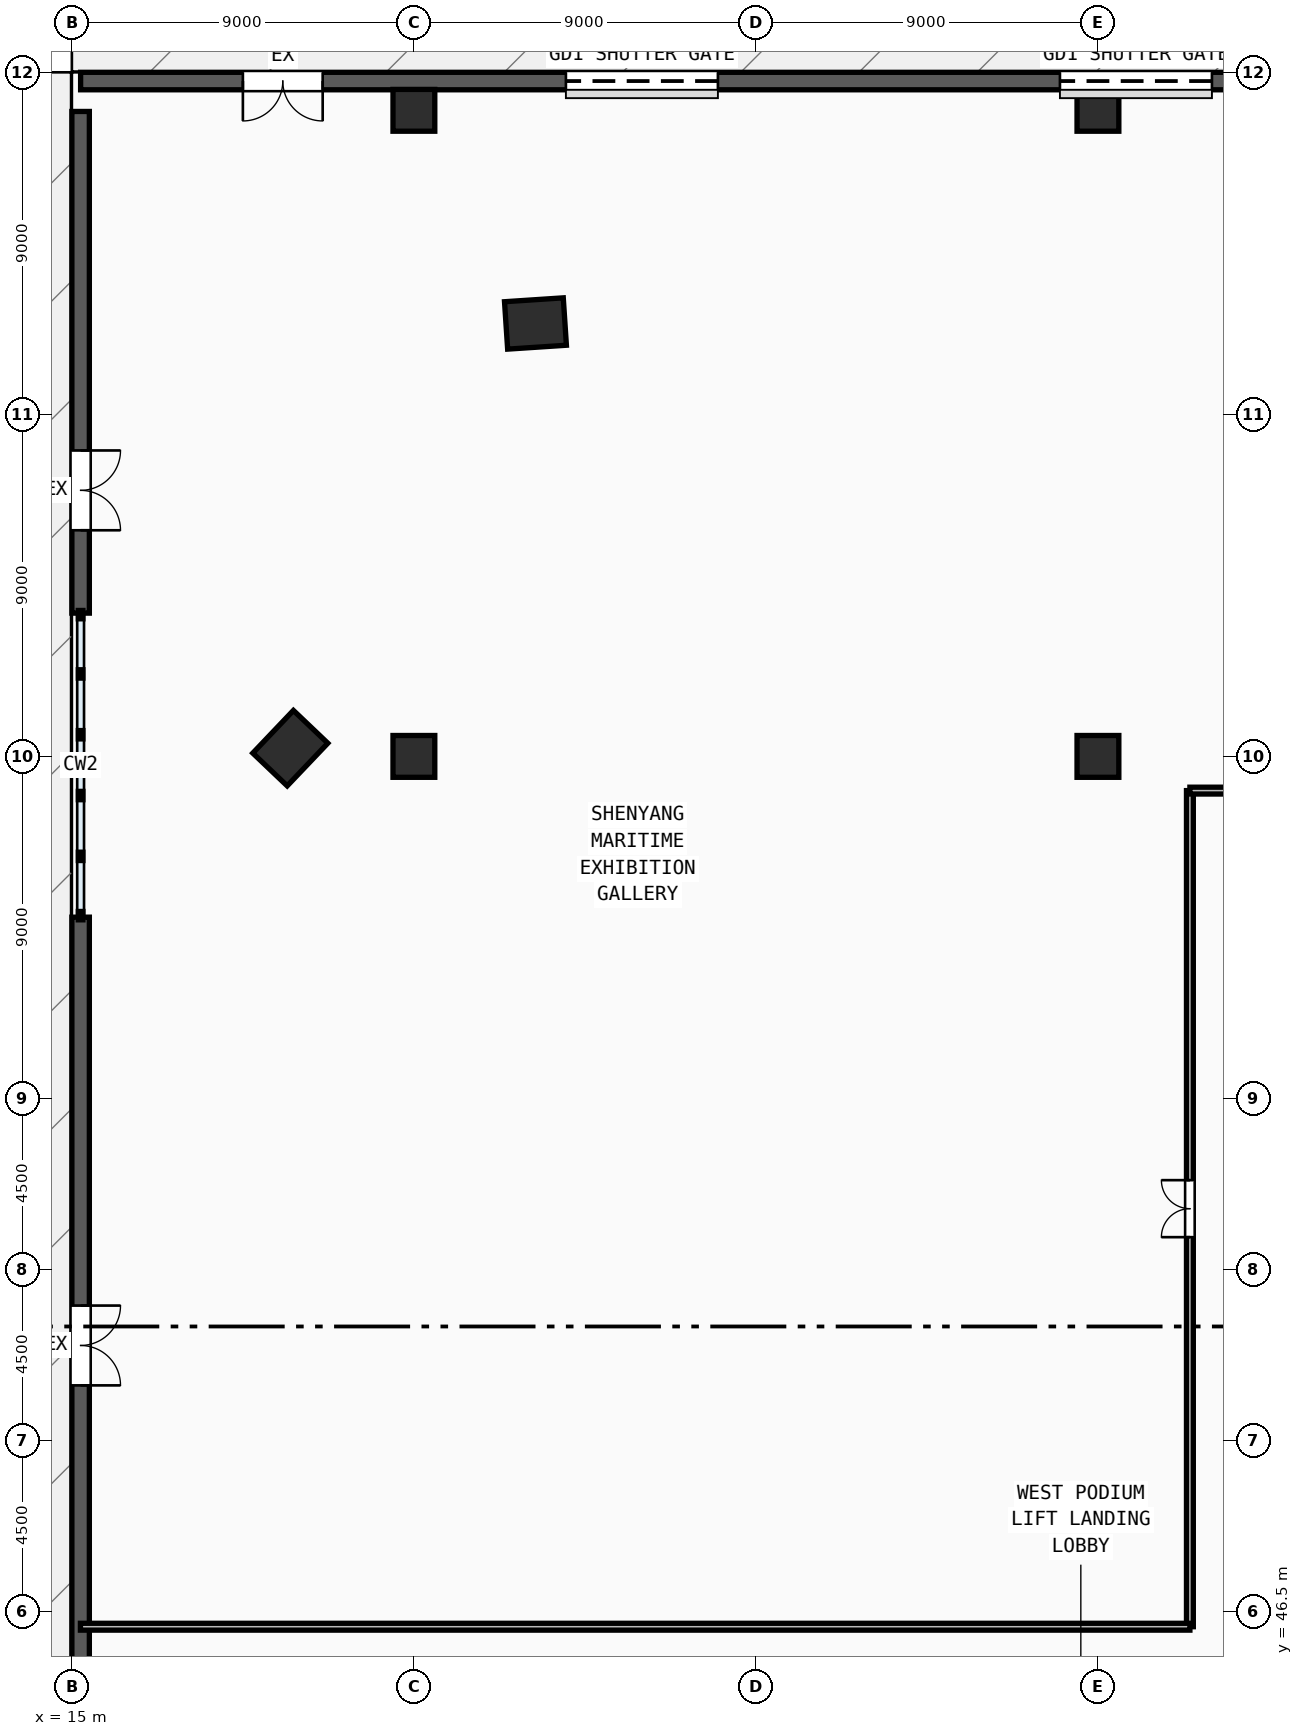
"""IFC4 building model, lengths in metres.
Left out: names, types, materials, properties, quantities, classifications, styles, units other than length and angle.
Written with IfcOpenShell. Run it as: python <this file> out.ifc"""

import sys

from ifc_helpers import new_model, si_unit, direction, frame, frame_2d, origin, origin_2d, place, context, subcontext, project, spatial, rectangle, extrude, source, transform, mapped, element, fill, save


model = new_model("IFC4")
c1 = context("Model", 3, precision=1e-05, world=origin(), true_north=direction((0.0, 1.0)))
c2 = subcontext(c1, "Body", "Model", "MODEL_VIEW")
j1 = project(units=[si_unit("LENGTHUNIT", "METRE"), si_unit("PLANEANGLEUNIT", "RADIAN")], contexts=[c1])
p1 = place(None, origin())
s1 = spatial("IfcSite", under=j1, at=p1, CompositionType="ELEMENT")
p2 = place(p1, origin())
s2 = spatial("IfcBuilding", under=s1, at=p2, CompositionType="ELEMENT")
p3 = place(p2, origin())
s3 = spatial("IfcBuildingStorey", under=s2, at=p3, CompositionType="ELEMENT", Elevation=0.0)
m1 = source(origin(), c2, "Body", "SweptSolid", [
    extrude(rectangle(XDim=1.55, YDim=1.25, at=origin_2d()), origin(), (0.0, 0.0, 1.0), 5.4),
])
for number, where, z_axis, x_axis in (
    (1, (20.748, 69.217, 0.0), (0.0, 0.0, 1.0), (0.689, 0.724, 0.0)),
    (2, (27.199, 80.391, 0.0), (0.0, 0.0, 1.0), (0.998, 0.066, 0.0)),
):
    element("IfcColumn", number, at=place(p3, frame(where, z_axis=z_axis, x_axis=x_axis)), inside=s3, PredefinedType="COLUMN", context=c2, shape_type="MappedRepresentation", body=[
        mapped(m1, transform((0.0, 0.0, 0.0), x_axis=(1.0, 0.0, 0.0), y_axis=(0.0, 1.0, 0.0), z_axis=(0.0, 0.0, 1.0), scale=1.0)),
    ])
m2 = source(origin(), c2, "Body", "SweptSolid", [
    extrude(rectangle(XDim=1.1, YDim=1.1, at=origin_2d()), origin(), (0.0, 0.0, 1.0), 5.4),
])
for number, where, z_axis, x_axis in (
    (3, (24.0, 69.0, 0.0), (0.0, 0.0, 1.0), (1.0, 0.0, 0.0)),
    (4, (42.0, 69.0, 0.0), (0.0, 0.0, 1.0), (1.0, 0.0, 0.0)),
    (5, (24.0, 86.0, 0.0), (0.0, 0.0, 1.0), (1.0, 0.0, 0.0)),
    (6, (42.0, 86.0, 0.0), (0.0, 0.0, 1.0), (1.0, 0.0, 0.0)),
):
    element("IfcColumn", number, at=place(p3, frame(where, z_axis=z_axis, x_axis=x_axis)), inside=s3, PredefinedType="COLUMN", context=c2, shape_type="MappedRepresentation", body=[
        mapped(m2, transform((0.0, 0.0, 0.0), x_axis=(1.0, 0.0, 0.0), y_axis=(0.0, 1.0, 0.0), z_axis=(0.0, 0.0, 1.0), scale=1.0)),
    ])
p4 = place(p3, frame((104.77, 86.77, 0.0), z_axis=(0.0, 0.0, 1.0), x_axis=(-1.0, 0.0, 0.0)))
e7 = element("IfcWall", 7, at=p4, inside=s3, PredefinedType="SOLIDWALL", context=c2, shape_type="SweptSolid", body=[
    extrude(rectangle(XDim=89.54, YDim=0.46, at=frame_2d((44.77, 0.0))), origin(), (0.0, 0.0, 1.0), 5.15),
])
m3 = source(origin(), c2, "Body", "SweptSolid", [
    extrude(rectangle(XDim=2.1, YDim=2.4, at=frame_2d((1.05, 1.2))), frame((0.0, 0.24, 0.0), z_axis=(0.0, -1.0, 0.0), x_axis=(1.0, 0.0, 0.0)), (0.0, 0.0, 1.0), 0.48),
])
p5 = place(p4, frame((49.42, 0.0, 0.0)))
e8 = element("IfcOpeningElement", 8, at=p5, cuts=e7, PredefinedType="OPENING", context=c2, shape_type="MappedRepresentation", body=[
    mapped(m3, transform((0.0, 0.0, 0.0), x_axis=(1.0, 0.0, 0.0), y_axis=(0.0, 1.0, 0.0), z_axis=(0.0, 0.0, 1.0), scale=1.0)),
])
p6 = place(p4, frame((83.17, 0.0, 0.0)))
e9 = element("IfcOpeningElement", 9, at=p6, cuts=e7, PredefinedType="OPENING", context=c2, shape_type="MappedRepresentation", body=[
    mapped(m3, transform((0.0, 0.0, 0.0), x_axis=(1.0, 0.0, 0.0), y_axis=(0.0, 1.0, 0.0), z_axis=(0.0, 0.0, 1.0), scale=1.0)),
])
p7 = place(p4, frame((44.17, 0.0, 0.0)))
e10 = element("IfcOpeningElement", 10, at=p7, cuts=e7, PredefinedType="OPENING", context=c2, shape_type="MappedRepresentation", body=[
    mapped(m3, transform((0.0, 0.0, 0.0), x_axis=(1.0, 0.0, 0.0), y_axis=(0.0, 1.0, 0.0), z_axis=(0.0, 0.0, 1.0), scale=1.0)),
])
m4 = source(origin(), c2, "Body", "SweptSolid", [
    extrude(rectangle(XDim=4.0, YDim=3.8, at=frame_2d((2.0, 1.9))), frame((0.0, 0.24, 0.0), z_axis=(0.0, -1.0, 0.0), x_axis=(1.0, 0.0, 0.0)), (0.0, 0.0, 1.0), 0.48),
])
p8 = place(p4, frame((72.77, 0.0, 0.0)))
e11 = element("IfcOpeningElement", 11, at=p8, cuts=e7, PredefinedType="OPENING", context=c2, shape_type="MappedRepresentation", body=[
    mapped(m4, transform((0.0, 0.0, 0.0), x_axis=(1.0, 0.0, 0.0), y_axis=(0.0, 1.0, 0.0), z_axis=(0.0, 0.0, 1.0), scale=1.0)),
])
p9 = place(p4, frame((59.77, 0.0, 0.0)))
e12 = element("IfcOpeningElement", 12, at=p9, cuts=e7, PredefinedType="OPENING", context=c2, shape_type="MappedRepresentation", body=[
    mapped(m4, transform((0.0, 0.0, 0.0), x_axis=(1.0, 0.0, 0.0), y_axis=(0.0, 1.0, 0.0), z_axis=(0.0, 0.0, 1.0), scale=1.0)),
])
p10 = place(p4, frame((35.77, 0.0, 0.0)))
e13 = element("IfcOpeningElement", 13, at=p10, cuts=e7, PredefinedType="OPENING", context=c2, shape_type="MappedRepresentation", body=[
    mapped(m4, transform((0.0, 0.0, 0.0), x_axis=(1.0, 0.0, 0.0), y_axis=(0.0, 1.0, 0.0), z_axis=(0.0, 0.0, 1.0), scale=1.0)),
])
p11 = place(p4, frame((16.77, 0.0, 0.0)))
e14 = element("IfcOpeningElement", 14, at=p11, cuts=e7, PredefinedType="OPENING", context=c2, shape_type="MappedRepresentation", body=[
    mapped(m4, transform((0.0, 0.0, 0.0), x_axis=(1.0, 0.0, 0.0), y_axis=(0.0, 1.0, 0.0), z_axis=(0.0, 0.0, 1.0), scale=1.0)),
])
p12 = place(p4, frame((2.27, 0.0, 0.0)))
e15 = element("IfcOpeningElement", 15, at=p12, cuts=e7, PredefinedType="OPENING", context=c2, shape_type="MappedRepresentation", body=[
    mapped(m4, transform((0.0, 0.0, 0.0), x_axis=(1.0, 0.0, 0.0), y_axis=(0.0, 1.0, 0.0), z_axis=(0.0, 0.0, 1.0), scale=1.0)),
])
p13 = place(p3, frame((15.23, 85.97, 0.0), z_axis=(0.0, 0.0, 1.0), x_axis=(0.0, -1.0, 0.0)))
e16 = element("IfcWall", 16, at=p13, inside=s3, PredefinedType="SOLIDWALL", context=c2, shape_type="SweptSolid", body=[
    extrude(rectangle(XDim=13.2, YDim=0.46, at=frame_2d((6.6, 0.0))), origin(), (0.0, 0.0, 1.0), 5.15),
])
p14 = place(p13, frame((8.92, 0.0, 0.0)))
e17 = element("IfcOpeningElement", 17, at=p14, cuts=e16, PredefinedType="OPENING", context=c2, shape_type="MappedRepresentation", body=[
    mapped(m3, transform((0.0, 0.0, 0.0), x_axis=(1.0, 0.0, 0.0), y_axis=(0.0, 1.0, 0.0), z_axis=(0.0, 0.0, 1.0), scale=1.0)),
])
p15 = place(p3, frame((15.23, 64.77, 0.0), z_axis=(0.0, 0.0, 1.0), x_axis=(0.0, -1.0, 0.0)))
e18 = element("IfcWall", 18, at=p15, inside=s3, PredefinedType="SOLIDWALL", context=c2, shape_type="SweptSolid", body=[
    extrude(rectangle(XDim=20.0, YDim=0.46, at=frame_2d((10.0, 0.0))), origin(), (0.0, 0.0, 1.0), 5.15),
])
p16 = place(p15, frame((10.22, 0.0, 0.0)))
e19 = element("IfcOpeningElement", 19, at=p16, cuts=e18, PredefinedType="OPENING", context=c2, shape_type="MappedRepresentation", body=[
    mapped(m3, transform((0.0, 0.0, 0.0), x_axis=(1.0, 0.0, 0.0), y_axis=(0.0, 1.0, 0.0), z_axis=(0.0, 0.0, 1.0), scale=1.0)),
])
p17 = place(p3, frame((44.42, 46.1, 0.0), z_axis=(0.0, 0.0, 1.0), x_axis=(0.0, 1.0, 0.0)))
e20 = element("IfcWall", 20, at=p17, inside=s3, PredefinedType="PARTITIONING", context=c2, shape_type="SweptSolid", body=[
    extrude(rectangle(XDim=22.0, YDim=0.18, at=frame_2d((11.0, 0.0))), origin(), (0.0, 0.0, 1.0), 5.15),
])
m5 = source(origin(), c2, "Body", "SweptSolid", [
    extrude(rectangle(XDim=1.5, YDim=2.2, at=frame_2d((0.75, 1.1))), frame((0.0, 0.1, 0.0), z_axis=(0.0, -1.0, 0.0), x_axis=(1.0, 0.0, 0.0)), (0.0, 0.0, 1.0), 0.2),
])
p18 = place(p17, frame((10.25, 0.0, 0.0)))
e21 = element("IfcOpeningElement", 21, at=p18, cuts=e20, PredefinedType="OPENING", context=c2, shape_type="MappedRepresentation", body=[
    mapped(m5, transform((0.0, 0.0, 0.0), x_axis=(1.0, 0.0, 0.0), y_axis=(0.0, 1.0, 0.0), z_axis=(0.0, 0.0, 1.0), scale=1.0)),
])
p19 = place(p3, frame((15.225, 46.1, 0.0), z_axis=(0.0, 0.0, 1.0), x_axis=(1.0, 0.0, 0.0)))
e22 = element("IfcWall", 22, at=p19, inside=s3, PredefinedType="PARTITIONING", context=c2, shape_type="SweptSolid", body=[
    extrude(rectangle(XDim=29.195, YDim=0.18, at=frame_2d((14.597, 0.0))), origin(), (0.0, 0.0, 1.0), 5.15),
])
p20 = place(p3, frame((44.42, 68.1, 0.0), z_axis=(0.0, 0.0, 1.0), x_axis=(1.0, 0.0, 0.0)))
e23 = element("IfcWall", 23, at=p20, inside=s3, PredefinedType="PARTITIONING", context=c2, shape_type="SweptSolid", body=[
    extrude(rectangle(XDim=3.88, YDim=0.18, at=frame_2d((1.94, 0.0))), origin(), (0.0, 0.0, 1.0), 5.15),
])
m6 = source(origin(), c2, "Body", "SweptSolid", [
    extrude(rectangle(XDim=2.1, YDim=2.4, at=frame_2d((1.05, 1.2))), frame((0.0, 0.025, 0.0), z_axis=(0.0, -1.0, 0.0), x_axis=(1.0, 0.0, 0.0)), (0.0, 0.0, 1.0), 0.05),
])
p21 = place(p6, frame((2.1, 0.0, 0.0), z_axis=(0.0, 0.0, 1.0), x_axis=(-1.0, 0.0, 0.0)))
e24 = element("IfcDoor", 24, at=p21, inside=s3, OperationType="DOUBLE_DOOR_SINGLE_SWING", PredefinedType="DOOR", context=c2, shape_type="MappedRepresentation", body=[
    mapped(m6, transform((0.0, 0.0, 0.0), x_axis=(1.0, 0.0, 0.0), y_axis=(0.0, 1.0, 0.0), z_axis=(0.0, 0.0, 1.0), scale=1.0)),
])
fill(e9, e24)
m7 = source(origin(), c2, "Body", "SweptSolid", [
    extrude(rectangle(XDim=4.0, YDim=3.8, at=frame_2d((2.0, 1.9))), frame((0.0, 0.025, 0.0), z_axis=(0.0, -1.0, 0.0), x_axis=(1.0, 0.0, 0.0)), (0.0, 0.0, 1.0), 0.05),
])
p22 = place(p8, origin())
e25 = element("IfcDoor", 25, at=p22, inside=s3, OperationType="ROLLINGUP", PredefinedType="GATE", context=c2, shape_type="MappedRepresentation", body=[
    mapped(m7, transform((0.0, 0.0, 0.0), x_axis=(1.0, 0.0, 0.0), y_axis=(0.0, 1.0, 0.0), z_axis=(0.0, 0.0, 1.0), scale=1.0)),
])
fill(e11, e25)
p23 = place(p9, origin())
e26 = element("IfcDoor", 26, at=p23, inside=s3, OperationType="ROLLINGUP", PredefinedType="GATE", context=c2, shape_type="MappedRepresentation", body=[
    mapped(m7, transform((0.0, 0.0, 0.0), x_axis=(1.0, 0.0, 0.0), y_axis=(0.0, 1.0, 0.0), z_axis=(0.0, 0.0, 1.0), scale=1.0)),
])
fill(e12, e26)
p24 = place(p16, frame((2.1, 0.0, 0.0), z_axis=(0.0, 0.0, 1.0), x_axis=(-1.0, 0.0, 0.0)))
e27 = element("IfcDoor", 27, at=p24, inside=s3, OperationType="DOUBLE_DOOR_SINGLE_SWING", PredefinedType="DOOR", context=c2, shape_type="MappedRepresentation", body=[
    mapped(m6, transform((0.0, 0.0, 0.0), x_axis=(1.0, 0.0, 0.0), y_axis=(0.0, 1.0, 0.0), z_axis=(0.0, 0.0, 1.0), scale=1.0)),
])
fill(e19, e27)
p25 = place(p14, frame((2.1, 0.0, 0.0), z_axis=(0.0, 0.0, 1.0), x_axis=(-1.0, 0.0, 0.0)))
e28 = element("IfcDoor", 28, at=p25, inside=s3, OperationType="DOUBLE_DOOR_SINGLE_SWING", PredefinedType="DOOR", context=c2, shape_type="MappedRepresentation", body=[
    mapped(m6, transform((0.0, 0.0, 0.0), x_axis=(1.0, 0.0, 0.0), y_axis=(0.0, 1.0, 0.0), z_axis=(0.0, 0.0, 1.0), scale=1.0)),
])
fill(e17, e28)
m8 = source(origin(), c2, "Body", "SweptSolid", [
    extrude(rectangle(XDim=1.5, YDim=2.2, at=frame_2d((0.75, 1.1))), frame((0.0, 0.025, 0.0), z_axis=(0.0, -1.0, 0.0), x_axis=(1.0, 0.0, 0.0)), (0.0, 0.0, 1.0), 0.05),
])
p26 = place(p18, origin())
e29 = element("IfcDoor", 29, at=p26, inside=s3, OperationType="DOUBLE_DOOR_SINGLE_SWING", PredefinedType="DOOR", context=c2, shape_type="MappedRepresentation", body=[
    mapped(m8, transform((0.0, 0.0, 0.0), x_axis=(1.0, 0.0, 0.0), y_axis=(0.0, 1.0, 0.0), z_axis=(0.0, 0.0, 1.0), scale=1.0)),
])
fill(e21, e29)
save(model, sys.argv[1])
